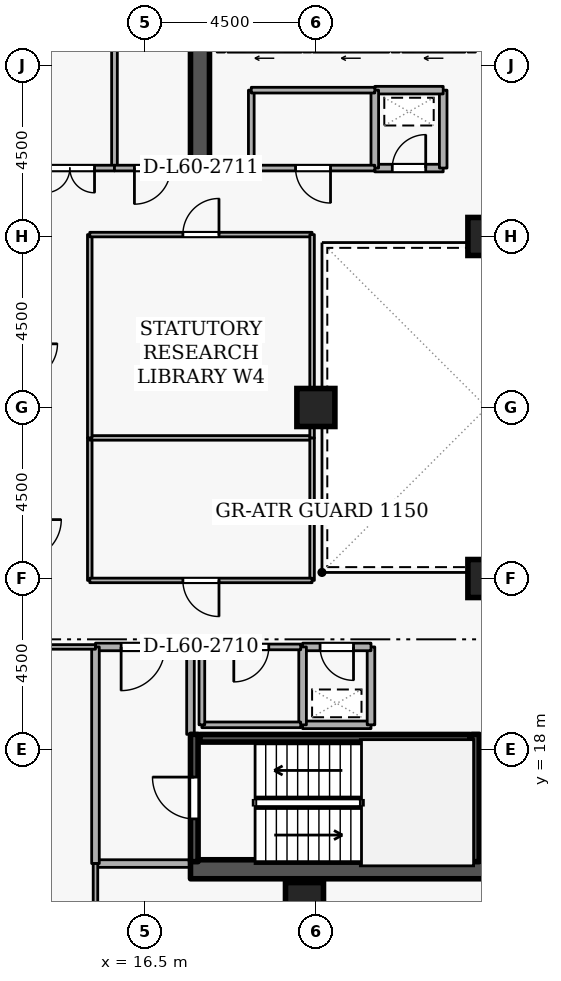
"""IFC4 building model, lengths in metres.
Left out: names, types, materials, properties, quantities, classifications, styles, units other than length and angle.
Written with IfcOpenShell. Run it as: python <this file> out.ifc"""

import sys

from ifc_helpers import new_model, si_unit, direction, frame, frame_2d, origin, origin_2d, place, context, subcontext, project, spatial, rectangle, extrude, element, fill, save


model = new_model("IFC4")
c1 = context("Model", 3, precision=1e-05, world=origin(), true_north=direction((0.0, 1.0)))
c2 = subcontext(c1, "Body", "Model", "MODEL_VIEW")
j1 = project(units=[si_unit("LENGTHUNIT", "METRE"), si_unit("PLANEANGLEUNIT", "RADIAN")], contexts=[c1])
p1 = place(None, origin())
s1 = spatial("IfcSite", under=j1, at=p1, CompositionType="ELEMENT")
p2 = place(p1, origin())
s2 = spatial("IfcBuilding", under=s1, at=p2, CompositionType="ELEMENT")
p3 = place(p2, frame((0.0, 0.0, 225.9)))
s3 = spatial("IfcBuildingStorey", under=s2, at=p3, CompositionType="ELEMENT", Elevation=225.9)
p4 = place(p3, frame((17.7, 14.85, 0.0), z_axis=(0.0, 0.0, 1.0), x_axis=(1.0, 0.0, 0.0)))
e1 = element("IfcWall", 1, at=p4, inside=s3, PredefinedType="SHEAR", context=c2, shape_type="SweptSolid", body=[
    extrude(rectangle(XDim=15.6, YDim=0.5, at=frame_2d((7.8, 0.0))), origin(), (0.0, 0.0, 1.0), 3.6),
])
p5 = place(p3, frame((17.95, 33.1, 0.0), z_axis=(0.0, 0.0, 1.0), x_axis=(0.0, 1.0, 0.0)))
e2 = element("IfcWall", 2, at=p5, inside=s3, PredefinedType="SHEAR", context=c2, shape_type="SweptSolid", body=[
    extrude(rectangle(XDim=5.8, YDim=0.5, at=frame_2d((2.9, 0.0))), origin(), (0.0, 0.0, 1.0), 3.6),
])
for number, where, z_axis, x_axis in (
    (3, (20.7, 14.0, 0.0), (0.0, 0.0, 1.0), (1.0, 0.0, 0.0)),
    (4, (25.5, 22.5, 0.0), (0.0, 0.0, 1.0), (1.0, 0.0, 0.0)),
    (5, (25.5, 31.5, 0.0), (0.0, 0.0, 1.0), (1.0, 0.0, 0.0)),
    (6, (21.0, 27.0, 0.0), (0.0, 0.0, 1.0), (1.0, 0.0, 0.0)),
):
    element("IfcColumn", number, at=place(p3, frame(where, z_axis=z_axis, x_axis=x_axis)), inside=s3, PredefinedType="COLUMN", context=c2, shape_type="SweptSolid", body=[
        extrude(rectangle(XDim=1.0, YDim=1.0, at=origin_2d()), origin(), (0.0, 0.0, 1.0), 3.6),
    ])
p6 = place(p3, frame((24.92, 36.45, 0.0), z_axis=(0.0, 0.0, 1.0), x_axis=(-1.0, 0.0, 0.0)))
e7 = element("IfcWall", 7, at=p6, inside=s3, PredefinedType="STANDARD", context=c2, shape_type="SweptSolid", body=[
    extrude(rectangle(XDim=1.64, YDim=0.2, at=frame_2d((0.82, 0.0))), origin(), (0.0, 0.0, 1.0), 3.3),
])
p7 = place(p6, frame((0.31, 0.0, 0.0)))
e8 = element("IfcOpeningElement", 8, at=p7, cuts=e7, PredefinedType="OPENING", context=c2, shape_type="SweptSolid", body=[
    extrude(rectangle(XDim=1.02, YDim=2.06, at=frame_2d((0.51, 1.03))), frame((0.0, 0.11, 0.0), z_axis=(0.0, -1.0, 0.0), x_axis=(1.0, 0.0, 0.0)), (0.0, 0.0, 1.0), 0.22),
])
p8 = place(p3, frame((22.92, 36.45, 0.0), z_axis=(0.0, 0.0, 1.0), x_axis=(-1.0, 0.0, 0.0)))
e9 = element("IfcWall", 9, at=p8, inside=s3, PredefinedType="STANDARD", context=c2, shape_type="SweptSolid", body=[
    extrude(rectangle(XDim=1.99, YDim=0.2, at=frame_2d((0.995, 0.0))), origin(), (0.0, 0.0, 1.0), 3.3),
])
p9 = place(p8, frame((0.485, 0.0, 0.0)))
e10 = element("IfcOpeningElement", 10, at=p9, cuts=e9, PredefinedType="OPENING", context=c2, shape_type="SweptSolid", body=[
    extrude(rectangle(XDim=1.02, YDim=2.06, at=frame_2d((0.51, 1.03))), frame((0.0, 0.11, 0.0), z_axis=(0.0, -1.0, 0.0), x_axis=(1.0, 0.0, 0.0)), (0.0, 0.0, 1.0), 0.22),
])
p10 = place(p3, frame((20.62, 36.45, 0.0), z_axis=(0.0, 0.0, 1.0), x_axis=(-1.0, 0.0, 0.0)))
e11 = element("IfcWall", 11, at=p10, inside=s3, PredefinedType="STANDARD", context=c2, shape_type="SweptSolid", body=[
    extrude(rectangle(XDim=1.94, YDim=0.2, at=frame_2d((0.97, 0.0))), origin(), (0.0, 0.0, 1.0), 3.3),
])
p11 = place(p10, frame((0.46, 0.0, 0.0)))
e12 = element("IfcOpeningElement", 12, at=p11, cuts=e11, PredefinedType="OPENING", context=c2, shape_type="SweptSolid", body=[
    extrude(rectangle(XDim=1.02, YDim=2.06, at=frame_2d((0.51, 1.03))), frame((0.0, 0.11, 0.0), z_axis=(0.0, -1.0, 0.0), x_axis=(1.0, 0.0, 0.0)), (0.0, 0.0, 1.0), 0.22),
])
p12 = place(p3, frame((17.8, 15.05, 0.0), z_axis=(0.0, 0.0, 1.0), x_axis=(0.0, 1.0, 0.0)))
e13 = element("IfcWall", 13, at=p12, inside=s3, PredefinedType="SHEAR", context=c2, shape_type="SweptSolid", body=[
    extrude(rectangle(XDim=3.35, YDim=0.2, at=frame_2d((1.675, 0.0))), origin(), (0.0, 0.0, 1.0), 3.6),
])
p13 = place(p12, frame((1.125, 0.0, 0.0)))
e14 = element("IfcOpeningElement", 14, at=p13, cuts=e13, PredefinedType="OPENING", context=c2, shape_type="SweptSolid", body=[
    extrude(rectangle(XDim=1.1, YDim=2.1, at=frame_2d((0.55, 1.05))), frame((0.0, 0.11, 0.0), z_axis=(0.0, -1.0, 0.0), x_axis=(1.0, 0.0, 0.0)), (0.0, 0.0, 1.0), 0.22),
])
p14 = place(p3, frame((25.2, 18.4, 0.0), z_axis=(0.0, 0.0, 1.0), x_axis=(0.0, -1.0, 0.0)))
e15 = element("IfcWall", 15, at=p14, inside=s3, PredefinedType="SHEAR", context=c2, shape_type="SweptSolid", body=[
    extrude(rectangle(XDim=3.35, YDim=0.2, at=frame_2d((1.675, 0.0))), origin(), (0.0, 0.0, 1.0), 3.6),
])
p15 = place(p3, frame((25.05, 18.297, 0.0), z_axis=(0.0, 0.0, 1.0), x_axis=(-1.0, 0.0, 0.0)))
e16 = element("IfcWall", 16, at=p15, inside=s3, PredefinedType="SHEAR", context=c2, shape_type="SweptSolid", body=[
    extrude(rectangle(XDim=7.1, YDim=0.2, at=frame_2d((3.55, 0.0))), origin(), (0.0, 0.0, 1.0), 3.6),
])
p16 = place(p3, frame((15.2, 15.0, 0.0), z_axis=(0.0, 0.0, 1.0), x_axis=(1.0, 0.0, 0.0)))
e17 = element("IfcWall", 17, at=p16, inside=s3, PredefinedType="STANDARD", context=c2, shape_type="SweptSolid", body=[
    extrude(rectangle(XDim=2.5, YDim=0.2, at=frame_2d((1.25, 0.0))), origin(), (0.0, 0.0, 1.0), 3.3),
])
p17 = place(p3, frame((17.7, 18.4, 0.0), z_axis=(0.0, 0.0, 1.0), x_axis=(0.0, 1.0, 0.0)))
e18 = element("IfcWall", 18, at=p17, inside=s3, PredefinedType="STANDARD", context=c2, shape_type="SweptSolid", body=[
    extrude(rectangle(XDim=2.3, YDim=0.2, at=frame_2d((1.15, 0.0))), origin(), (0.0, 0.0, 1.0), 2.505),
])
p18 = place(p3, frame((17.7, 20.7, 0.0), z_axis=(0.0, 0.0, 1.0), x_axis=(-1.0, 0.0, 0.0)))
e19 = element("IfcWall", 19, at=p18, inside=s3, PredefinedType="STANDARD", context=c2, shape_type="SweptSolid", body=[
    extrude(rectangle(XDim=2.5, YDim=0.2, at=frame_2d((1.25, 0.0))), origin(), (0.0, 0.0, 1.0), 3.3),
])
p19 = place(p18, frame((0.675, 0.0, 0.0)))
e20 = element("IfcOpeningElement", 20, at=p19, cuts=e19, PredefinedType="OPENING", context=c2, shape_type="SweptSolid", body=[
    extrude(rectangle(XDim=1.15, YDim=2.1, at=frame_2d((0.575, 1.05))), frame((0.0, 0.11, 0.0), z_axis=(0.0, -1.0, 0.0), x_axis=(1.0, 0.0, 0.0)), (0.0, 0.0, 1.0), 0.22),
])
p20 = place(p3, frame((15.2, 20.7, 0.0), z_axis=(0.0, 0.0, 1.0), x_axis=(0.0, -1.0, 0.0)))
e21 = element("IfcWall", 21, at=p20, inside=s3, PredefinedType="STANDARD", context=c2, shape_type="SweptSolid", body=[
    extrude(rectangle(XDim=5.7, YDim=0.2, at=frame_2d((2.85, 0.0))), origin(), (0.0, 0.0, 1.0), 3.3),
])
p21 = place(p3, frame((20.65, 18.65, 0.0), z_axis=(0.0, 0.0, 1.0), x_axis=(1.0, 0.0, 0.0)))
e22 = element("IfcWall", 22, at=p21, inside=s3, PredefinedType="STANDARD", context=c2, shape_type="SweptSolid", body=[
    extrude(rectangle(XDim=1.8, YDim=0.2, at=frame_2d((0.9, 0.0))), origin(), (0.0, 0.0, 1.0), 3.3),
])
p22 = place(p3, frame((22.45, 18.65, 0.0), z_axis=(0.0, 0.0, 1.0), x_axis=(0.0, 1.0, 0.0)))
e23 = element("IfcWall", 23, at=p22, inside=s3, PredefinedType="STANDARD", context=c2, shape_type="SweptSolid", body=[
    extrude(rectangle(XDim=2.05, YDim=0.2, at=frame_2d((1.025, 0.0))), origin(), (0.0, 0.0, 1.0), 3.3),
])
p23 = place(p3, frame((22.45, 20.7, 0.0), z_axis=(0.0, 0.0, 1.0), x_axis=(-1.0, 0.0, 0.0)))
e24 = element("IfcWall", 24, at=p23, inside=s3, PredefinedType="STANDARD", context=c2, shape_type="SweptSolid", body=[
    extrude(rectangle(XDim=1.8, YDim=0.2, at=frame_2d((0.9, 0.0))), origin(), (0.0, 0.0, 1.0), 3.3),
])
p24 = place(p23, frame((0.46, 0.0, 0.0)))
e25 = element("IfcOpeningElement", 25, at=p24, cuts=e24, PredefinedType="OPENING", context=c2, shape_type="SweptSolid", body=[
    extrude(rectangle(XDim=0.88, YDim=2.04, at=frame_2d((0.44, 1.02))), frame((0.0, 0.11, 0.0), z_axis=(0.0, -1.0, 0.0), x_axis=(1.0, 0.0, 0.0)), (0.0, 0.0, 1.0), 0.22),
])
p25 = place(p3, frame((20.65, 20.7, 0.0), z_axis=(0.0, 0.0, 1.0), x_axis=(0.0, -1.0, 0.0)))
e26 = element("IfcWall", 26, at=p25, inside=s3, PredefinedType="STANDARD", context=c2, shape_type="SweptSolid", body=[
    extrude(rectangle(XDim=2.05, YDim=0.2, at=frame_2d((1.025, 0.0))), origin(), (0.0, 0.0, 1.0), 3.3),
])
p26 = place(p3, frame((22.55, 33.3, 0.0), z_axis=(0.0, 0.0, 1.0), x_axis=(1.0, 0.0, 0.0)))
e27 = element("IfcWall", 27, at=p26, inside=s3, PredefinedType="STANDARD", context=c2, shape_type="SweptSolid", body=[
    extrude(rectangle(XDim=1.8, YDim=0.2, at=frame_2d((0.9, 0.0))), origin(), (0.0, 0.0, 1.0), 3.3),
])
p27 = place(p26, frame((0.46, 0.0, 0.0)))
e28 = element("IfcOpeningElement", 28, at=p27, cuts=e27, PredefinedType="OPENING", context=c2, shape_type="SweptSolid", body=[
    extrude(rectangle(XDim=0.88, YDim=2.04, at=frame_2d((0.44, 1.02))), frame((0.0, 0.11, 0.0), z_axis=(0.0, -1.0, 0.0), x_axis=(1.0, 0.0, 0.0)), (0.0, 0.0, 1.0), 0.22),
])
p28 = place(p3, frame((24.35, 33.3, 0.0), z_axis=(0.0, 0.0, 1.0), x_axis=(0.0, 1.0, 0.0)))
e29 = element("IfcWall", 29, at=p28, inside=s3, PredefinedType="STANDARD", context=c2, shape_type="SweptSolid", body=[
    extrude(rectangle(XDim=2.05, YDim=0.2, at=frame_2d((1.025, 0.0))), origin(), (0.0, 0.0, 1.0), 3.3),
])
p29 = place(p3, frame((24.35, 35.35, 0.0), z_axis=(0.0, 0.0, 1.0), x_axis=(-1.0, 0.0, 0.0)))
e30 = element("IfcWall", 30, at=p29, inside=s3, PredefinedType="STANDARD", context=c2, shape_type="SweptSolid", body=[
    extrude(rectangle(XDim=1.8, YDim=0.2, at=frame_2d((0.9, 0.0))), origin(), (0.0, 0.0, 1.0), 3.3),
])
p30 = place(p3, frame((22.55, 35.35, 0.0), z_axis=(0.0, 0.0, 1.0), x_axis=(0.0, -1.0, 0.0)))
e31 = element("IfcWall", 31, at=p30, inside=s3, PredefinedType="STANDARD", context=c2, shape_type="SweptSolid", body=[
    extrude(rectangle(XDim=2.05, YDim=0.2, at=frame_2d((1.025, 0.0))), origin(), (0.0, 0.0, 1.0), 3.3),
])
p31 = place(p3, frame((18.0, 18.65, 0.0), z_axis=(0.0, 0.0, 1.0), x_axis=(1.0, 0.0, 0.0)))
e32 = element("IfcWall", 32, at=p31, inside=s3, PredefinedType="PARTITIONING", context=c2, shape_type="SweptSolid", body=[
    extrude(rectangle(XDim=2.6, YDim=0.15, at=frame_2d((1.3, 0.0))), origin(), (0.0, 0.0, 1.0), 3.3),
])
p32 = place(p3, frame((20.6, 20.7, 0.0), z_axis=(0.0, 0.0, 1.0), x_axis=(-1.0, 0.0, 0.0)))
e33 = element("IfcWall", 33, at=p32, inside=s3, PredefinedType="PARTITIONING", context=c2, shape_type="SweptSolid", body=[
    extrude(rectangle(XDim=2.6, YDim=0.15, at=frame_2d((1.3, 0.0))), origin(), (0.0, 0.0, 1.0), 3.3),
])
p33 = place(p32, frame((0.84, 0.0, 0.0)))
e34 = element("IfcOpeningElement", 34, at=p33, cuts=e33, PredefinedType="OPENING", context=c2, shape_type="SweptSolid", body=[
    extrude(rectangle(XDim=0.92, YDim=2.08, at=frame_2d((0.46, 1.04))), frame((0.0, 0.085, 0.0), z_axis=(0.0, -1.0, 0.0), x_axis=(1.0, 0.0, 0.0)), (0.0, 0.0, 1.0), 0.17),
])
p34 = place(p3, frame((18.0, 20.7, 0.0), z_axis=(0.0, 0.0, 1.0), x_axis=(0.0, -1.0, 0.0)))
e35 = element("IfcWall", 35, at=p34, inside=s3, PredefinedType="PARTITIONING", context=c2, shape_type="SweptSolid", body=[
    extrude(rectangle(XDim=2.05, YDim=0.15, at=frame_2d((1.025, 0.0))), origin(), (0.0, 0.0, 1.0), 2.505),
])
p35 = place(p3, frame((19.3, 33.3, 0.0), z_axis=(0.0, 0.0, 1.0), x_axis=(0.0, 1.0, 0.0)))
e36 = element("IfcWall", 36, at=p35, inside=s3, PredefinedType="PARTITIONING", context=c2, shape_type="SweptSolid", body=[
    extrude(rectangle(XDim=2.05, YDim=0.15, at=frame_2d((1.025, 0.0))), origin(), (0.0, 0.0, 1.0), 3.3),
])
p36 = place(p3, frame((19.3, 35.35, 0.0), z_axis=(0.0, 0.0, 1.0), x_axis=(1.0, 0.0, 0.0)))
e37 = element("IfcWall", 37, at=p36, inside=s3, PredefinedType="PARTITIONING", context=c2, shape_type="SweptSolid", body=[
    extrude(rectangle(XDim=3.25, YDim=0.15, at=frame_2d((1.625, 0.0))), origin(), (0.0, 0.0, 1.0), 3.3),
])
p37 = place(p3, frame((22.55, 33.3, 0.0), z_axis=(0.0, 0.0, 1.0), x_axis=(-1.0, 0.0, 0.0)))
e38 = element("IfcWall", 38, at=p37, inside=s3, PredefinedType="PARTITIONING", context=c2, shape_type="SweptSolid", body=[
    extrude(rectangle(XDim=3.25, YDim=0.15, at=frame_2d((1.625, 0.0))), origin(), (0.0, 0.0, 1.0), 3.3),
])
p38 = place(p37, frame((1.165, 0.0, 0.0)))
e39 = element("IfcOpeningElement", 39, at=p38, cuts=e38, PredefinedType="OPENING", context=c2, shape_type="SweptSolid", body=[
    extrude(rectangle(XDim=0.92, YDim=2.08, at=frame_2d((0.46, 1.04))), frame((0.0, 0.085, 0.0), z_axis=(0.0, -1.0, 0.0), x_axis=(1.0, 0.0, 0.0)), (0.0, 0.0, 1.0), 0.17),
])
p39 = place(p3, frame((15.7, 50.72, 0.0), z_axis=(0.0, 0.0, 1.0), x_axis=(0.0, -1.0, 0.0)))
e40 = element("IfcWall", 40, at=p39, inside=s3, PredefinedType="PARTITIONING", context=c2, shape_type="SweptSolid", body=[
    extrude(rectangle(XDim=17.42, YDim=0.15, at=frame_2d((8.71, 0.0))), origin(), (0.0, 0.0, 1.0), 3.3),
])
p40 = place(p3, frame((15.7, 33.3, 0.0), z_axis=(0.0, 0.0, 1.0), x_axis=(-1.0, 0.0, 0.0)))
e41 = element("IfcWall", 41, at=p40, inside=s3, PredefinedType="PARTITIONING", context=c2, shape_type="SweptSolid", body=[
    extrude(rectangle(XDim=2.35, YDim=0.15, at=frame_2d((1.175, 0.0))), origin(), (0.0, 0.0, 1.0), 3.3),
])
p41 = place(p40, frame((0.525, 0.0, 0.0)))
e42 = element("IfcOpeningElement", 42, at=p41, cuts=e41, PredefinedType="OPENING", context=c2, shape_type="SweptSolid", body=[
    extrude(rectangle(XDim=1.3, YDim=2.12, at=frame_2d((0.65, 1.06))), frame((0.0, 0.085, 0.0), z_axis=(0.0, -1.0, 0.0), x_axis=(1.0, 0.0, 0.0)), (0.0, 0.0, 1.0), 0.17),
])
p42 = place(p3, frame((17.7, 33.3, 0.0), z_axis=(0.0, 0.0, 1.0), x_axis=(-1.0, 0.0, 0.0)))
e43 = element("IfcWall", 43, at=p42, inside=s3, PredefinedType="PARTITIONING", context=c2, shape_type="SweptSolid", body=[
    extrude(rectangle(XDim=2.0, YDim=0.15, at=frame_2d((1.0, 0.0))), origin(), (0.0, 0.0, 1.0), 3.3),
])
p43 = place(p42, frame((0.525, 0.0, 0.0)))
e44 = element("IfcOpeningElement", 44, at=p43, cuts=e43, PredefinedType="OPENING", context=c2, shape_type="SweptSolid", body=[
    extrude(rectangle(XDim=0.95, YDim=2.1, at=frame_2d((0.475, 1.05))), frame((0.0, 0.085, 0.0), z_axis=(0.0, -1.0, 0.0), x_axis=(1.0, 0.0, 0.0)), (0.0, 0.0, 1.0), 0.17),
])
p44 = place(p3, frame((13.25, 20.7, 0.0), z_axis=(0.0, 0.0, 1.0), x_axis=(1.0, 0.0, 0.0)))
e45 = element("IfcWall", 45, at=p44, inside=s3, PredefinedType="PARTITIONING", context=c2, shape_type="SweptSolid", body=[
    extrude(rectangle(XDim=1.95, YDim=0.12, at=frame_2d((0.975, 0.0))), origin(), (0.0, 0.0, 1.0), 3.3),
])
p45 = place(p3, frame((15.2, 15.0, 0.0), z_axis=(0.0, 0.0, 1.0), x_axis=(0.0, -1.0, 0.0)))
e46 = element("IfcWall", 46, at=p45, inside=s3, PredefinedType="PARTITIONING", context=c2, shape_type="SweptSolid", body=[
    extrude(rectangle(XDim=5.72, YDim=0.12, at=frame_2d((2.86, 0.0))), origin(), (0.0, 0.0, 1.0), 3.3),
])
p46 = place(p3, frame((15.05, 22.45, 0.0), z_axis=(0.0, 0.0, 1.0), x_axis=(0.0, 1.0, 0.0)))
e47 = element("IfcWall", 47, at=p46, inside=s3, PredefinedType="PARTITIONING", context=c2, shape_type="SweptSolid", body=[
    extrude(rectangle(XDim=3.75, YDim=0.12, at=frame_2d((1.875, 0.0))), origin(), (0.0, 0.0, 1.0), 3.3),
])
p47 = place(p3, frame((15.05, 26.2, 0.0), z_axis=(0.0, 0.0, 1.0), x_axis=(1.0, 0.0, 0.0)))
e48 = element("IfcWall", 48, at=p47, inside=s3, PredefinedType="PARTITIONING", context=c2, shape_type="SweptSolid", body=[
    extrude(rectangle(XDim=5.85, YDim=0.12, at=frame_2d((2.925, 0.0))), origin(), (0.0, 0.0, 1.0), 3.3),
])
p48 = place(p3, frame((20.9, 26.2, 0.0), z_axis=(0.0, 0.0, 1.0), x_axis=(0.0, -1.0, 0.0)))
e49 = element("IfcWall", 49, at=p48, inside=s3, PredefinedType="PARTITIONING", context=c2, shape_type="SweptSolid", body=[
    extrude(rectangle(XDim=3.75, YDim=0.12, at=frame_2d((1.875, 0.0))), origin(), (0.0, 0.0, 1.0), 3.3),
])
p49 = place(p3, frame((20.9, 22.45, 0.0), z_axis=(0.0, 0.0, 1.0), x_axis=(-1.0, 0.0, 0.0)))
e50 = element("IfcWall", 50, at=p49, inside=s3, PredefinedType="PARTITIONING", context=c2, shape_type="SweptSolid", body=[
    extrude(rectangle(XDim=5.85, YDim=0.12, at=frame_2d((2.925, 0.0))), origin(), (0.0, 0.0, 1.0), 3.3),
])
p50 = place(p49, frame((2.45, 0.0, 0.0)))
e51 = element("IfcOpeningElement", 51, at=p50, cuts=e50, PredefinedType="OPENING", context=c2, shape_type="SweptSolid", body=[
    extrude(rectangle(XDim=0.95, YDim=2.1, at=frame_2d((0.475, 1.05))), frame((0.0, 0.07, 0.0), z_axis=(0.0, -1.0, 0.0), x_axis=(1.0, 0.0, 0.0)), (0.0, 0.0, 1.0), 0.14),
])
p51 = place(p3, frame((15.05, 26.2, 0.0), z_axis=(0.0, 0.0, 1.0), x_axis=(0.0, 1.0, 0.0)))
e52 = element("IfcWall", 52, at=p51, inside=s3, PredefinedType="PARTITIONING", context=c2, shape_type="SweptSolid", body=[
    extrude(rectangle(XDim=5.35, YDim=0.12, at=frame_2d((2.675, 0.0))), origin(), (0.0, 0.0, 1.0), 3.3),
])
p52 = place(p3, frame((15.05, 31.55, 0.0), z_axis=(0.0, 0.0, 1.0), x_axis=(1.0, 0.0, 0.0)))
e53 = element("IfcWall", 53, at=p52, inside=s3, PredefinedType="PARTITIONING", context=c2, shape_type="SweptSolid", body=[
    extrude(rectangle(XDim=5.85, YDim=0.12, at=frame_2d((2.925, 0.0))), origin(), (0.0, 0.0, 1.0), 3.3),
])
p53 = place(p52, frame((2.45, 0.0, 0.0)))
e54 = element("IfcOpeningElement", 54, at=p53, cuts=e53, PredefinedType="OPENING", context=c2, shape_type="SweptSolid", body=[
    extrude(rectangle(XDim=0.95, YDim=2.1, at=frame_2d((0.475, 1.05))), frame((0.0, 0.07, 0.0), z_axis=(0.0, -1.0, 0.0), x_axis=(1.0, 0.0, 0.0)), (0.0, 0.0, 1.0), 0.14),
])
p54 = place(p3, frame((20.9, 31.55, 0.0), z_axis=(0.0, 0.0, 1.0), x_axis=(0.0, -1.0, 0.0)))
e55 = element("IfcWall", 55, at=p54, inside=s3, PredefinedType="PARTITIONING", context=c2, shape_type="SweptSolid", body=[
    extrude(rectangle(XDim=5.35, YDim=0.12, at=frame_2d((2.675, 0.0))), origin(), (0.0, 0.0, 1.0), 3.3),
])
p55 = place(p13, origin())
e56 = element("IfcDoor", 56, at=p55, inside=s3, OperationType="SINGLE_SWING_RIGHT", PredefinedType="DOOR", context=c2, shape_type="SweptSolid", body=[
    extrude(rectangle(XDim=1.1, YDim=2.1, at=frame_2d((0.55, 1.05))), frame((0.0, 0.025, 0.0), z_axis=(0.0, -1.0, 0.0), x_axis=(1.0, 0.0, 0.0)), (0.0, 0.0, 1.0), 0.05),
])
fill(e14, e56)
p56 = place(p19, origin())
e57 = element("IfcDoor", 57, at=p56, inside=s3, OperationType="SINGLE_SWING_RIGHT", PredefinedType="DOOR", context=c2, shape_type="SweptSolid", body=[
    extrude(rectangle(XDim=1.15, YDim=2.1, at=frame_2d((0.575, 1.05))), frame((0.0, 0.025, 0.0), z_axis=(0.0, -1.0, 0.0), x_axis=(1.0, 0.0, 0.0)), (0.0, 0.0, 1.0), 0.05),
])
fill(e20, e57)
p57 = place(p24, origin())
e58 = element("IfcDoor", 58, at=p57, inside=s3, OperationType="SINGLE_SWING_LEFT", PredefinedType="DOOR", context=c2, shape_type="SweptSolid", body=[
    extrude(rectangle(XDim=0.88, YDim=2.04, at=frame_2d((0.44, 1.02))), frame((0.0, 0.025, 0.0), z_axis=(0.0, -1.0, 0.0), x_axis=(1.0, 0.0, 0.0)), (0.0, 0.0, 1.0), 0.05),
])
fill(e25, e58)
p58 = place(p27, origin())
e59 = element("IfcDoor", 59, at=p58, inside=s3, OperationType="SINGLE_SWING_RIGHT", PredefinedType="DOOR", context=c2, shape_type="SweptSolid", body=[
    extrude(rectangle(XDim=0.88, YDim=2.04, at=frame_2d((0.44, 1.02))), frame((0.0, 0.025, 0.0), z_axis=(0.0, -1.0, 0.0), x_axis=(1.0, 0.0, 0.0)), (0.0, 0.0, 1.0), 0.05),
])
fill(e28, e59)
p59 = place(p33, origin())
e60 = element("IfcDoor", 60, at=p59, inside=s3, OperationType="SINGLE_SWING_RIGHT", PredefinedType="DOOR", context=c2, shape_type="SweptSolid", body=[
    extrude(rectangle(XDim=0.92, YDim=2.08, at=frame_2d((0.46, 1.04))), frame((0.0, 0.025, 0.0), z_axis=(0.0, -1.0, 0.0), x_axis=(1.0, 0.0, 0.0)), (0.0, 0.0, 1.0), 0.05),
])
fill(e34, e60)
p60 = place(p38, origin())
e61 = element("IfcDoor", 61, at=p60, inside=s3, OperationType="SINGLE_SWING_LEFT", PredefinedType="DOOR", context=c2, shape_type="SweptSolid", body=[
    extrude(rectangle(XDim=0.92, YDim=2.08, at=frame_2d((0.46, 1.04))), frame((0.0, 0.025, 0.0), z_axis=(0.0, -1.0, 0.0), x_axis=(1.0, 0.0, 0.0)), (0.0, 0.0, 1.0), 0.05),
])
fill(e39, e61)
p61 = place(p41, origin())
e62 = element("IfcDoor", 62, at=p61, inside=s3, OperationType="DOUBLE_DOOR_SINGLE_SWING", PredefinedType="DOOR", context=c2, shape_type="SweptSolid", body=[
    extrude(rectangle(XDim=1.3, YDim=2.12, at=frame_2d((0.65, 1.06))), frame((0.0, 0.025, 0.0), z_axis=(0.0, -1.0, 0.0), x_axis=(1.0, 0.0, 0.0)), (0.0, 0.0, 1.0), 0.05),
])
fill(e42, e62)
p62 = place(p43, origin())
e63 = element("IfcDoor", 63, at=p62, inside=s3, OperationType="SINGLE_SWING_RIGHT", PredefinedType="DOOR", context=c2, shape_type="SweptSolid", body=[
    extrude(rectangle(XDim=0.95, YDim=2.1, at=frame_2d((0.475, 1.05))), frame((0.0, 0.025, 0.0), z_axis=(0.0, -1.0, 0.0), x_axis=(1.0, 0.0, 0.0)), (0.0, 0.0, 1.0), 0.05),
])
fill(e44, e63)
p63 = place(p50, origin())
e64 = element("IfcDoor", 64, at=p63, inside=s3, OperationType="SINGLE_SWING_LEFT", PredefinedType="DOOR", context=c2, shape_type="SweptSolid", body=[
    extrude(rectangle(XDim=0.95, YDim=2.1, at=frame_2d((0.475, 1.05))), frame((0.0, 0.025, 0.0), z_axis=(0.0, -1.0, 0.0), x_axis=(1.0, 0.0, 0.0)), (0.0, 0.0, 1.0), 0.05),
])
fill(e51, e64)
p64 = place(p53, origin())
e65 = element("IfcDoor", 65, at=p64, inside=s3, OperationType="SINGLE_SWING_RIGHT", PredefinedType="DOOR", context=c2, shape_type="SweptSolid", body=[
    extrude(rectangle(XDim=0.95, YDim=2.1, at=frame_2d((0.475, 1.05))), frame((0.0, 0.025, 0.0), z_axis=(0.0, -1.0, 0.0), x_axis=(1.0, 0.0, 0.0)), (0.0, 0.0, 1.0), 0.05),
])
fill(e54, e65)
save(model, sys.argv[1])
